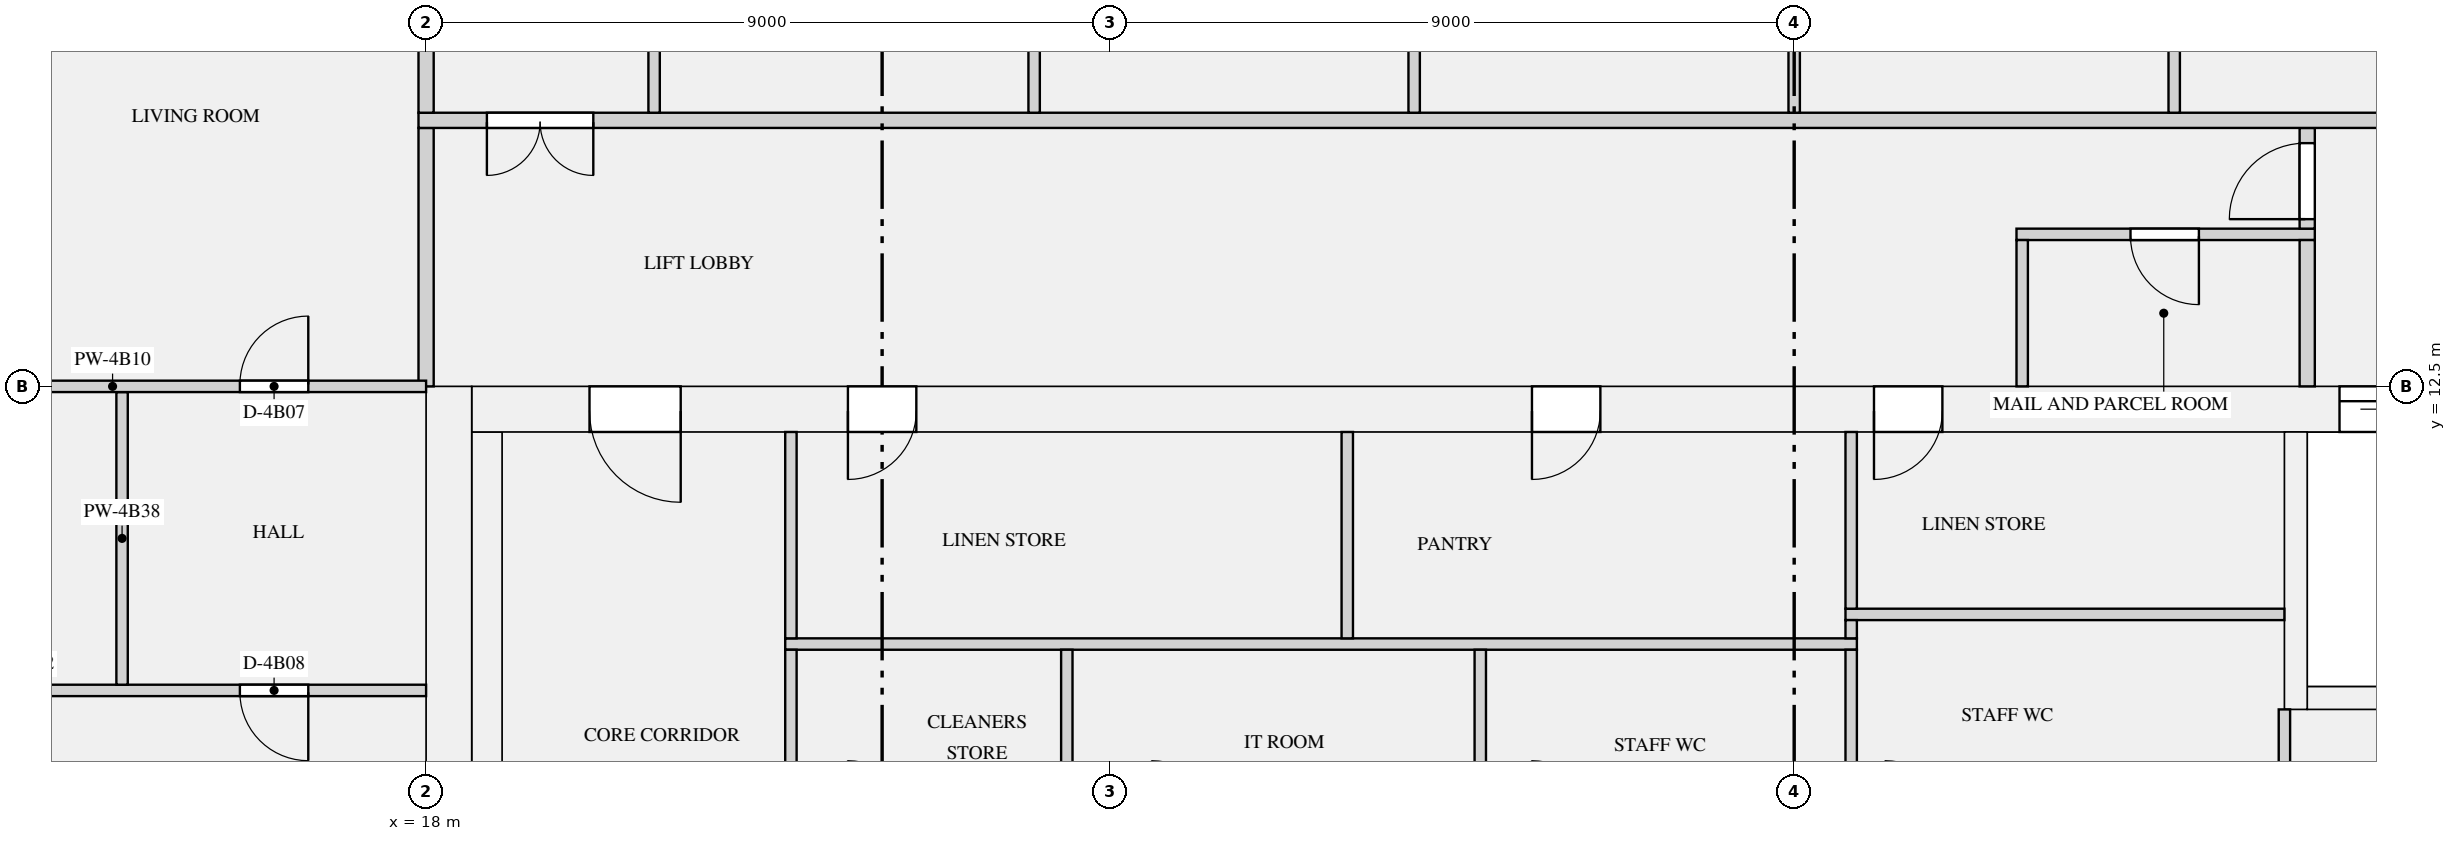
"""IFC4 building model, lengths in metres.
Left out: names, types, materials, properties, quantities, classifications, styles, units other than length and angle.
Written with IfcOpenShell. Run it as: python <this file> out.ifc"""

import sys

from ifc_helpers import new_model, si_unit, direction, frame, frame_2d, origin, place, context, subcontext, project, spatial, rectangle, extrude, element, fill, save


model = new_model("IFC4")
c1 = context("Model", 3, precision=1e-05, world=origin(), true_north=direction((0.0, 1.0)))
c2 = subcontext(c1, "Body", "Model", "MODEL_VIEW")
j1 = project(units=[si_unit("LENGTHUNIT", "METRE"), si_unit("PLANEANGLEUNIT", "RADIAN")], contexts=[c1])
p1 = place(None, origin())
s1 = spatial("IfcSite", under=j1, at=p1, CompositionType="ELEMENT")
p2 = place(p1, origin())
s2 = spatial("IfcBuilding", under=s1, at=p2, CompositionType="ELEMENT")
p3 = place(p2, frame((0.0, 0.0, 207.45)))
s3 = spatial("IfcBuildingStorey", under=s2, at=p3, CompositionType="ELEMENT", Elevation=207.45)
p4 = place(p3, frame((18.3, 0.0, 0.0), z_axis=(0.0, 0.0, 1.0), x_axis=(0.0, 1.0, 0.0)))
e1 = element("IfcWall", 1, at=p4, inside=s3, PredefinedType="SHEAR", context=c2, shape_type="SweptSolid", body=[
    extrude(rectangle(XDim=12.5, YDim=0.6, at=frame_2d((6.25, 0.0))), origin(), (0.0, 0.0, 1.0), 3.15),
])
p5 = place(p3, frame((18.6, 12.2, 0.0), z_axis=(0.0, 0.0, 1.0), x_axis=(1.0, 0.0, 0.0)))
e2 = element("IfcWall", 2, at=p5, inside=s3, PredefinedType="SHEAR", context=c2, shape_type="SweptSolid", body=[
    extrude(rectangle(XDim=34.8, YDim=0.6, at=frame_2d((17.4, 0.0))), origin(), (0.0, 0.0, 1.0), 3.15),
])
p6 = place(p5, frame((24.575, 0.0, 0.0)))
e3 = element("IfcOpeningElement", 3, at=p6, cuts=e2, PredefinedType="OPENING", context=c2, shape_type="SweptSolid", body=[
    extrude(rectangle(XDim=1.1, YDim=2.1, at=frame_2d((0.55, 1.05))), frame((0.0, 0.31, 0.0), z_axis=(0.0, -1.0, 0.0), x_axis=(1.0, 0.0, 0.0)), (0.0, 0.0, 1.0), 0.62),
])
p7 = place(p5, frame((26.825, 0.0, 0.0)))
e4 = element("IfcOpeningElement", 4, at=p7, cuts=e2, PredefinedType="OPENING", context=c2, shape_type="SweptSolid", body=[
    extrude(rectangle(XDim=1.1, YDim=2.1, at=frame_2d((0.55, 1.05))), frame((0.0, 0.31, 0.0), z_axis=(0.0, -1.0, 0.0), x_axis=(1.0, 0.0, 0.0)), (0.0, 0.0, 1.0), 0.62),
])
p8 = place(p5, frame((29.075, 0.0, 0.0)))
e5 = element("IfcOpeningElement", 5, at=p8, cuts=e2, PredefinedType="OPENING", context=c2, shape_type="SweptSolid", body=[
    extrude(rectangle(XDim=1.1, YDim=2.1, at=frame_2d((0.55, 1.05))), frame((0.0, 0.31, 0.0), z_axis=(0.0, -1.0, 0.0), x_axis=(1.0, 0.0, 0.0)), (0.0, 0.0, 1.0), 0.62),
])
p9 = place(p5, frame((4.95, 0.0, 0.0)))
e6 = element("IfcOpeningElement", 6, at=p9, cuts=e2, PredefinedType="OPENING", context=c2, shape_type="SweptSolid", body=[
    extrude(rectangle(XDim=0.9, YDim=2.1, at=frame_2d((0.45, 1.05))), frame((0.0, 0.31, 0.0), z_axis=(0.0, -1.0, 0.0), x_axis=(1.0, 0.0, 0.0)), (0.0, 0.0, 1.0), 0.62),
])
p10 = place(p5, frame((13.95, 0.0, 0.0)))
e7 = element("IfcOpeningElement", 7, at=p10, cuts=e2, PredefinedType="OPENING", context=c2, shape_type="SweptSolid", body=[
    extrude(rectangle(XDim=0.9, YDim=2.1, at=frame_2d((0.45, 1.05))), frame((0.0, 0.31, 0.0), z_axis=(0.0, -1.0, 0.0), x_axis=(1.0, 0.0, 0.0)), (0.0, 0.0, 1.0), 0.62),
])
p11 = place(p5, frame((18.45, 0.0, 0.0)))
e8 = element("IfcOpeningElement", 8, at=p11, cuts=e2, PredefinedType="OPENING", context=c2, shape_type="SweptSolid", body=[
    extrude(rectangle(XDim=0.9, YDim=2.1, at=frame_2d((0.45, 1.05))), frame((0.0, 0.31, 0.0), z_axis=(0.0, -1.0, 0.0), x_axis=(1.0, 0.0, 0.0)), (0.0, 0.0, 1.0), 0.62),
])
p12 = place(p5, frame((1.55, 0.0, 0.0)))
e9 = element("IfcOpeningElement", 9, at=p12, cuts=e2, PredefinedType="OPENING", context=c2, shape_type="SweptSolid", body=[
    extrude(rectangle(XDim=1.2, YDim=2.1, at=frame_2d((0.6, 1.05))), frame((0.0, 0.31, 0.0), z_axis=(0.0, -1.0, 0.0), x_axis=(1.0, 0.0, 0.0)), (0.0, 0.0, 1.0), 0.62),
])
p13 = place(p5, frame((32.05, 0.0, 0.0)))
e10 = element("IfcOpeningElement", 10, at=p13, cuts=e2, PredefinedType="OPENING", context=c2, shape_type="SweptSolid", body=[
    extrude(rectangle(XDim=1.2, YDim=2.1, at=frame_2d((0.6, 1.05))), frame((0.0, 0.31, 0.0), z_axis=(0.0, -1.0, 0.0), x_axis=(1.0, 0.0, 0.0)), (0.0, 0.0, 1.0), 0.62),
])
p14 = place(p3, frame((18.8, 1.0, 0.0), z_axis=(0.0, 0.0, 1.0), x_axis=(0.0, 1.0, 0.0)))
e11 = element("IfcWall", 11, at=p14, inside=s3, PredefinedType="SHEAR", context=c2, shape_type="SweptSolid", body=[
    extrude(rectangle(XDim=10.9, YDim=0.4, at=frame_2d((5.45, 0.0))), origin(), (0.0, 0.0, 1.0), 3.15),
])
p15 = place(p3, frame((42.75, 8.4, 0.0), z_axis=(0.0, 0.0, 1.0), x_axis=(1.0, 0.0, 0.0)))
e12 = element("IfcWall", 12, at=p15, inside=s3, PredefinedType="SHEAR", context=c2, shape_type="SweptSolid", body=[
    extrude(rectangle(XDim=1.95, YDim=0.3, at=frame_2d((0.975, 0.0))), origin(), (0.0, 0.0, 1.0), 3.15),
])
p16 = place(p3, frame((42.6, 8.25, 0.0), z_axis=(0.0, 0.0, 1.0), x_axis=(0.0, 1.0, 0.0)))
e13 = element("IfcWall", 13, at=p16, inside=s3, PredefinedType="SHEAR", context=c2, shape_type="SweptSolid", body=[
    extrude(rectangle(XDim=3.65, YDim=0.3, at=frame_2d((1.825, 0.0))), origin(), (0.0, 0.0, 1.0), 3.15),
])
p17 = place(p3, frame((22.725, 9.11, 0.0), z_axis=(0.0, 0.0, 1.0), x_axis=(1.0, 0.0, 0.0)))
e14 = element("IfcWall", 14, at=p17, inside=s3, PredefinedType="PARTITIONING", context=c2, shape_type="SweptSolid", body=[
    extrude(rectangle(XDim=14.1, YDim=0.15, at=frame_2d((7.05, 0.0))), origin(), (0.0, 0.0, 1.0), 2.83),
])
p18 = place(p3, frame((36.675, 9.5, 0.0), z_axis=(0.0, 0.0, 1.0), x_axis=(1.0, 0.0, 0.0)))
e15 = element("IfcWall", 15, at=p18, inside=s3, PredefinedType="PARTITIONING", context=c2, shape_type="SweptSolid", body=[
    extrude(rectangle(XDim=5.775, YDim=0.15, at=frame_2d((2.887, 0.0))), origin(), (0.0, 0.0, 1.0), 2.83),
])
p19 = place(p3, frame((38.925, 14.5, 0.0), z_axis=(0.0, 0.0, 1.0), x_axis=(1.0, 0.0, 0.0)))
e16 = element("IfcWall", 16, at=p19, inside=s3, PredefinedType="PARTITIONING", context=c2, shape_type="SweptSolid", body=[
    extrude(rectangle(XDim=3.925, YDim=0.15, at=frame_2d((1.962, 0.0))), origin(), (0.0, 0.0, 1.0), 2.83),
])
p20 = place(p19, frame((1.5, 0.0, 0.0)))
e17 = element("IfcOpeningElement", 17, at=p20, cuts=e16, PredefinedType="OPENING", context=c2, shape_type="SweptSolid", body=[
    extrude(rectangle(XDim=0.9, YDim=2.1, at=frame_2d((0.45, 1.05))), frame((0.0, 0.085, 0.0), z_axis=(0.0, -1.0, 0.0), x_axis=(1.0, 0.0, 0.0)), (0.0, 0.0, 1.0), 0.17),
])
p21 = place(p3, frame((42.45, 6.65, 0.0), z_axis=(0.0, 0.0, 1.0), x_axis=(0.0, 1.0, 0.0)))
e18 = element("IfcWall", 18, at=p21, inside=s3, PredefinedType="PARTITIONING", context=c2, shape_type="SweptSolid", body=[
    extrude(rectangle(XDim=1.6, YDim=0.15, at=frame_2d((0.8, 0.0))), origin(), (0.0, 0.0, 1.0), 2.83),
])
for number, where, z_axis, x_axis in (
    (19, (22.8, 6.725, 0.0), (0.0, 0.0, 1.0), (0.0, 1.0, 0.0)),
    (20, (26.43, 6.725, 0.0), (0.0, 0.0, 1.0), (0.0, 1.0, 0.0)),
    (21, (31.87, 6.725, 0.0), (0.0, 0.0, 1.0), (0.0, 1.0, 0.0)),
    (22, (36.75, 6.725, 0.0), (0.0, 0.0, 1.0), (0.0, 1.0, 0.0)),
):
    element("IfcWall", number, at=place(p3, frame(where, z_axis=z_axis, x_axis=x_axis)), inside=s3, PredefinedType="PARTITIONING", context=c2, shape_type="SweptSolid", body=[
        extrude(rectangle(XDim=2.31, YDim=0.15, at=frame_2d((1.155, 0.0))), origin(), (0.0, 0.0, 1.0), 2.83),
    ])
for number, where, z_axis, x_axis in (
    (23, (22.8, 9.185, 0.0), (0.0, 0.0, 1.0), (0.0, 1.0, 0.0)),
    (24, (30.12, 9.185, 0.0), (0.0, 0.0, 1.0), (0.0, 1.0, 0.0)),
):
    element("IfcWall", number, at=place(p3, frame(where, z_axis=z_axis, x_axis=x_axis)), inside=s3, PredefinedType="PARTITIONING", context=c2, shape_type="SweptSolid", body=[
        extrude(rectangle(XDim=2.715, YDim=0.15, at=frame_2d((1.357, 0.0))), origin(), (0.0, 0.0, 1.0), 2.83),
    ])
p22 = place(p3, frame((36.75, 9.185, 0.0), z_axis=(0.0, 0.0, 1.0), x_axis=(0.0, 1.0, 0.0)))
e25 = element("IfcWall", 25, at=p22, inside=s3, PredefinedType="PARTITIONING", context=c2, shape_type="SweptSolid", body=[
    extrude(rectangle(XDim=0.24, YDim=0.15, at=frame_2d((0.12, 0.0))), origin(), (0.0, 0.0, 1.0), 2.83),
])
p23 = place(p3, frame((36.75, 9.575, 0.0), z_axis=(0.0, 0.0, 1.0), x_axis=(0.0, 1.0, 0.0)))
e26 = element("IfcWall", 26, at=p23, inside=s3, PredefinedType="PARTITIONING", context=c2, shape_type="SweptSolid", body=[
    extrude(rectangle(XDim=2.325, YDim=0.15, at=frame_2d((1.163, 0.0))), origin(), (0.0, 0.0, 1.0), 2.83),
])
p24 = place(p3, frame((18.0, 12.5, 0.0), z_axis=(0.0, 0.0, 1.0), x_axis=(0.0, 1.0, 0.0)))
e27 = element("IfcWall", 27, at=p24, inside=s3, PredefinedType="PARTITIONING", context=c2, shape_type="SweptSolid", body=[
    extrude(rectangle(XDim=3.4, YDim=0.2, at=frame_2d((1.7, 0.0))), origin(), (0.0, 0.0, 1.0), 2.83),
])
p25 = place(p3, frame((39.0, 12.5, 0.0), z_axis=(0.0, 0.0, 1.0), x_axis=(0.0, 1.0, 0.0)))
e28 = element("IfcWall", 28, at=p25, inside=s3, PredefinedType="PARTITIONING", context=c2, shape_type="SweptSolid", body=[
    extrude(rectangle(XDim=1.925, YDim=0.15, at=frame_2d((0.962, 0.0))), origin(), (0.0, 0.0, 1.0), 2.83),
])
p26 = place(p3, frame((42.75, 12.5, 0.0), z_axis=(0.0, 0.0, 1.0), x_axis=(0.0, 1.0, 0.0)))
e29 = element("IfcWall", 29, at=p26, inside=s3, PredefinedType="PARTITIONING", context=c2, shape_type="SweptSolid", body=[
    extrude(rectangle(XDim=1.925, YDim=0.2, at=frame_2d((0.962, 0.0))), origin(), (0.0, 0.0, 1.0), 2.83),
])
p27 = place(p3, frame((42.75, 14.575, 0.0), z_axis=(0.0, 0.0, 1.0), x_axis=(0.0, 1.0, 0.0)))
e30 = element("IfcWall", 30, at=p27, inside=s3, PredefinedType="PARTITIONING", context=c2, shape_type="SweptSolid", body=[
    extrude(rectangle(XDim=1.325, YDim=0.2, at=frame_2d((0.663, 0.0))), origin(), (0.0, 0.0, 1.0), 2.83),
])
p28 = place(p27, frame((0.125, 0.0, 0.0)))
e31 = element("IfcOpeningElement", 31, at=p28, cuts=e30, PredefinedType="OPENING", context=c2, shape_type="SweptSolid", body=[
    extrude(rectangle(XDim=1.0, YDim=2.1, at=frame_2d((0.5, 1.05))), frame((0.0, 0.11, 0.0), z_axis=(0.0, -1.0, 0.0), x_axis=(1.0, 0.0, 0.0)), (0.0, 0.0, 1.0), 0.22),
])
p29 = place(p3, frame((9.65, 12.5, 0.0), z_axis=(0.0, 0.0, 1.0), x_axis=(1.0, 0.0, 0.0)))
e32 = element("IfcWall", 32, at=p29, inside=s3, PredefinedType="PARTITIONING", context=c2, shape_type="SweptSolid", body=[
    extrude(rectangle(XDim=8.35, YDim=0.15, at=frame_2d((4.175, 0.0))), origin(), (0.0, 0.0, 1.0), 2.83),
])
p30 = place(p29, frame((1.65, 0.0, 0.0)))
e33 = element("IfcOpeningElement", 33, at=p30, cuts=e32, PredefinedType="OPENING", context=c2, shape_type="SweptSolid", body=[
    extrude(rectangle(XDim=0.9, YDim=2.1, at=frame_2d((0.45, 1.05))), frame((0.0, 0.085, 0.0), z_axis=(0.0, -1.0, 0.0), x_axis=(1.0, 0.0, 0.0)), (0.0, 0.0, 1.0), 0.17),
])
p31 = place(p29, frame((5.9, 0.0, 0.0)))
e34 = element("IfcOpeningElement", 34, at=p31, cuts=e32, PredefinedType="OPENING", context=c2, shape_type="SweptSolid", body=[
    extrude(rectangle(XDim=0.9, YDim=2.1, at=frame_2d((0.45, 1.05))), frame((0.0, 0.085, 0.0), z_axis=(0.0, -1.0, 0.0), x_axis=(1.0, 0.0, 0.0)), (0.0, 0.0, 1.0), 0.17),
])
p32 = place(p3, frame((9.65, 8.5, 0.0), z_axis=(0.0, 0.0, 1.0), x_axis=(1.0, 0.0, 0.0)))
e35 = element("IfcWall", 35, at=p32, inside=s3, PredefinedType="PARTITIONING", context=c2, shape_type="SweptSolid", body=[
    extrude(rectangle(XDim=8.35, YDim=0.15, at=frame_2d((4.175, 0.0))), origin(), (0.0, 0.0, 1.0), 2.83),
])
p33 = place(p32, frame((5.9, 0.0, 0.0)))
e36 = element("IfcOpeningElement", 36, at=p33, cuts=e35, PredefinedType="OPENING", context=c2, shape_type="SweptSolid", body=[
    extrude(rectangle(XDim=0.9, YDim=2.1, at=frame_2d((0.45, 1.05))), frame((0.0, 0.085, 0.0), z_axis=(0.0, -1.0, 0.0), x_axis=(1.0, 0.0, 0.0)), (0.0, 0.0, 1.0), 0.17),
])
p34 = place(p3, frame((17.9, 16.0, 0.0), z_axis=(0.0, 0.0, 1.0), x_axis=(1.0, 0.0, 0.0)))
e37 = element("IfcWall", 37, at=p34, inside=s3, PredefinedType="PARTITIONING", context=c2, shape_type="SweptSolid", body=[
    extrude(rectangle(XDim=36.2, YDim=0.2, at=frame_2d((18.1, 0.0))), origin(), (0.0, 0.0, 1.0), 2.83),
])
p35 = place(p34, frame((0.9, 0.0, 0.0)))
e38 = element("IfcOpeningElement", 38, at=p35, cuts=e37, PredefinedType="OPENING", context=c2, shape_type="SweptSolid", body=[
    extrude(rectangle(XDim=1.4, YDim=2.1, at=frame_2d((0.7, 1.05))), frame((0.0, 0.11, 0.0), z_axis=(0.0, -1.0, 0.0), x_axis=(1.0, 0.0, 0.0)), (0.0, 0.0, 1.0), 0.22),
])
p36 = place(p34, frame((33.9, 0.0, 0.0)))
e39 = element("IfcOpeningElement", 39, at=p36, cuts=e37, PredefinedType="OPENING", context=c2, shape_type="SweptSolid", body=[
    extrude(rectangle(XDim=1.4, YDim=2.1, at=frame_2d((0.7, 1.05))), frame((0.0, 0.11, 0.0), z_axis=(0.0, -1.0, 0.0), x_axis=(1.0, 0.0, 0.0)), (0.0, 0.0, 1.0), 0.22),
])
p37 = place(p3, frame((18.0, 16.1, 0.0), z_axis=(0.0, 0.0, 1.0), x_axis=(0.0, 1.0, 0.0)))
e40 = element("IfcWall", 40, at=p37, inside=s3, PredefinedType="PARTITIONING", context=c2, shape_type="SweptSolid", body=[
    extrude(rectangle(XDim=7.8, YDim=0.2, at=frame_2d((3.9, 0.0))), origin(), (0.0, 0.0, 1.0), 2.83),
])
p38 = place(p37, frame((5.35, 0.0, 0.0)))
e41 = element("IfcOpeningElement", 41, at=p38, cuts=e40, PredefinedType="OPENING", context=c2, shape_type="SweptSolid", body=[
    extrude(rectangle(XDim=1.1, YDim=2.1, at=frame_2d((0.55, 1.05))), frame((0.0, 0.11, 0.0), z_axis=(0.0, -1.0, 0.0), x_axis=(1.0, 0.0, 0.0)), (0.0, 0.0, 1.0), 0.22),
])
p39 = place(p3, frame((21.0, 16.1, 0.0), z_axis=(0.0, 0.0, 1.0), x_axis=(0.0, 1.0, 0.0)))
e42 = element("IfcWall", 42, at=p39, inside=s3, PredefinedType="PARTITIONING", context=c2, shape_type="SweptSolid", body=[
    extrude(rectangle(XDim=4.825, YDim=0.15, at=frame_2d((2.413, 0.0))), origin(), (0.0, 0.0, 1.0), 2.83),
])
p40 = place(p3, frame((14.0, 8.575, 0.0), z_axis=(0.0, 0.0, 1.0), x_axis=(0.0, 1.0, 0.0)))
e43 = element("IfcWall", 43, at=p40, inside=s3, PredefinedType="PARTITIONING", context=c2, shape_type="SweptSolid", body=[
    extrude(rectangle(XDim=3.85, YDim=0.15, at=frame_2d((1.925, 0.0))), origin(), (0.0, 0.0, 1.0), 2.83),
])
for number, where, z_axis, x_axis in (
    (44, (36.0, 16.1, 0.0), (0.0, 0.0, 1.0), (0.0, 1.0, 0.0)),
    (45, (26.0, 16.1, 0.0), (0.0, 0.0, 1.0), (0.0, 1.0, 0.0)),
    (46, (31.0, 16.1, 0.0), (0.0, 0.0, 1.0), (0.0, 1.0, 0.0)),
    (47, (41.0, 16.1, 0.0), (0.0, 0.0, 1.0), (0.0, 1.0, 0.0)),
):
    element("IfcWall", number, at=place(p3, frame(where, z_axis=z_axis, x_axis=x_axis)), inside=s3, PredefinedType="PARTITIONING", context=c2, shape_type="SweptSolid", body=[
        extrude(rectangle(XDim=4.825, YDim=0.15, at=frame_2d((2.413, 0.0))), origin(), (0.0, 0.0, 1.0), 2.83),
    ])
p41 = place(p6, origin())
e48 = element("IfcDoor", 48, at=p41, inside=s3, OperationType="DOUBLE_DOOR_SLIDING", PredefinedType="DOOR", context=c2, shape_type="SweptSolid", body=[
    extrude(rectangle(XDim=1.1, YDim=2.1, at=frame_2d((0.55, 1.05))), frame((0.0, 0.025, 0.0), z_axis=(0.0, -1.0, 0.0), x_axis=(1.0, 0.0, 0.0)), (0.0, 0.0, 1.0), 0.05),
])
fill(e3, e48)
p42 = place(p20, frame((0.9, 0.0, 0.0), z_axis=(0.0, 0.0, 1.0), x_axis=(-1.0, 0.0, 0.0)))
e49 = element("IfcDoor", 49, at=p42, inside=s3, OperationType="SINGLE_SWING_LEFT", PredefinedType="DOOR", context=c2, shape_type="SweptSolid", body=[
    extrude(rectangle(XDim=0.9, YDim=2.1, at=frame_2d((0.45, 1.05))), frame((0.0, 0.025, 0.0), z_axis=(0.0, -1.0, 0.0), x_axis=(1.0, 0.0, 0.0)), (0.0, 0.0, 1.0), 0.05),
])
fill(e17, e49)
p43 = place(p9, frame((0.9, 0.0, 0.0), z_axis=(0.0, 0.0, 1.0), x_axis=(-1.0, 0.0, 0.0)))
e50 = element("IfcDoor", 50, at=p43, inside=s3, OperationType="SINGLE_SWING_RIGHT", PredefinedType="DOOR", context=c2, shape_type="SweptSolid", body=[
    extrude(rectangle(XDim=0.9, YDim=2.1, at=frame_2d((0.45, 1.05))), frame((0.0, 0.025, 0.0), z_axis=(0.0, -1.0, 0.0), x_axis=(1.0, 0.0, 0.0)), (0.0, 0.0, 1.0), 0.05),
])
fill(e6, e50)
p44 = place(p10, frame((0.9, 0.0, 0.0), z_axis=(0.0, 0.0, 1.0), x_axis=(-1.0, 0.0, 0.0)))
e51 = element("IfcDoor", 51, at=p44, inside=s3, OperationType="SINGLE_SWING_RIGHT", PredefinedType="DOOR", context=c2, shape_type="SweptSolid", body=[
    extrude(rectangle(XDim=0.9, YDim=2.1, at=frame_2d((0.45, 1.05))), frame((0.0, 0.025, 0.0), z_axis=(0.0, -1.0, 0.0), x_axis=(1.0, 0.0, 0.0)), (0.0, 0.0, 1.0), 0.05),
])
fill(e7, e51)
p45 = place(p11, frame((0.9, 0.0, 0.0), z_axis=(0.0, 0.0, 1.0), x_axis=(-1.0, 0.0, 0.0)))
e52 = element("IfcDoor", 52, at=p45, inside=s3, OperationType="SINGLE_SWING_RIGHT", PredefinedType="DOOR", context=c2, shape_type="SweptSolid", body=[
    extrude(rectangle(XDim=0.9, YDim=2.1, at=frame_2d((0.45, 1.05))), frame((0.0, 0.025, 0.0), z_axis=(0.0, -1.0, 0.0), x_axis=(1.0, 0.0, 0.0)), (0.0, 0.0, 1.0), 0.05),
])
fill(e8, e52)
p46 = place(p12, frame((1.2, 0.0, 0.0), z_axis=(0.0, 0.0, 1.0), x_axis=(-1.0, 0.0, 0.0)))
e53 = element("IfcDoor", 53, at=p46, inside=s3, OperationType="SINGLE_SWING_LEFT", PredefinedType="DOOR", context=c2, shape_type="SweptSolid", body=[
    extrude(rectangle(XDim=1.2, YDim=2.1, at=frame_2d((0.6, 1.05))), frame((0.0, 0.025, 0.0), z_axis=(0.0, -1.0, 0.0), x_axis=(1.0, 0.0, 0.0)), (0.0, 0.0, 1.0), 0.05),
])
fill(e9, e53)
p47 = place(p28, origin())
e54 = element("IfcDoor", 54, at=p47, inside=s3, OperationType="SINGLE_SWING_LEFT", PredefinedType="DOOR", context=c2, shape_type="SweptSolid", body=[
    extrude(rectangle(XDim=1.0, YDim=2.1, at=frame_2d((0.5, 1.05))), frame((0.0, 0.025, 0.0), z_axis=(0.0, -1.0, 0.0), x_axis=(1.0, 0.0, 0.0)), (0.0, 0.0, 1.0), 0.05),
])
fill(e31, e54)
p48 = place(p35, frame((1.4, 0.0, 0.0), z_axis=(0.0, 0.0, 1.0), x_axis=(-1.0, 0.0, 0.0)))
e55 = element("IfcDoor", 55, at=p48, inside=s3, OperationType="DOUBLE_DOOR_SINGLE_SWING", PredefinedType="DOOR", context=c2, shape_type="SweptSolid", body=[
    extrude(rectangle(XDim=1.4, YDim=2.1, at=frame_2d((0.7, 1.05))), frame((0.0, 0.025, 0.0), z_axis=(0.0, -1.0, 0.0), x_axis=(1.0, 0.0, 0.0)), (0.0, 0.0, 1.0), 0.05),
])
fill(e38, e55)
p49 = place(p31, origin())
e56 = element("IfcDoor", 56, at=p49, inside=s3, OperationType="SINGLE_SWING_RIGHT", PredefinedType="DOOR", context=c2, shape_type="SweptSolid", body=[
    extrude(rectangle(XDim=0.9, YDim=2.1, at=frame_2d((0.45, 1.05))), frame((0.0, 0.025, 0.0), z_axis=(0.0, -1.0, 0.0), x_axis=(1.0, 0.0, 0.0)), (0.0, 0.0, 1.0), 0.05),
])
fill(e34, e56)
p50 = place(p33, frame((0.9, 0.0, 0.0), z_axis=(0.0, 0.0, 1.0), x_axis=(-1.0, 0.0, 0.0)))
e57 = element("IfcDoor", 57, at=p50, inside=s3, OperationType="SINGLE_SWING_LEFT", PredefinedType="DOOR", context=c2, shape_type="SweptSolid", body=[
    extrude(rectangle(XDim=0.9, YDim=2.1, at=frame_2d((0.45, 1.05))), frame((0.0, 0.025, 0.0), z_axis=(0.0, -1.0, 0.0), x_axis=(1.0, 0.0, 0.0)), (0.0, 0.0, 1.0), 0.05),
])
fill(e36, e57)
save(model, sys.argv[1])
